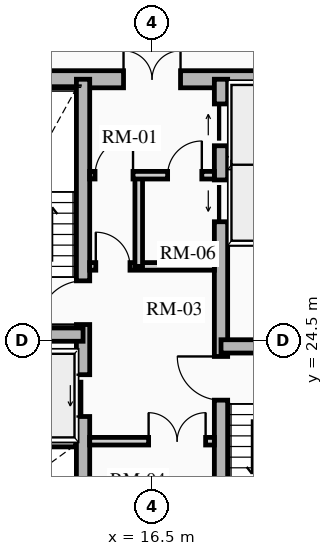
"""IFC4 building model, lengths in metres.
Left out: names, types, materials, properties, quantities, classifications, styles, units other than length and angle.
Written with IfcOpenShell. Run it as: python <this file> out.ifc"""

import sys

from ifc_helpers import new_model, si_unit, direction, frame, frame_2d, origin, place, context, subcontext, project, spatial, rectangle, extrude, source, transform, mapped, element, fill, save


model = new_model("IFC4")
c1 = context("Model", 3, precision=1e-05, world=origin(), true_north=direction((0.0, 1.0)))
c2 = subcontext(c1, "Body", "Model", "MODEL_VIEW")
j1 = project(units=[si_unit("LENGTHUNIT", "METRE"), si_unit("PLANEANGLEUNIT", "RADIAN")], contexts=[c1])
p1 = place(None, origin())
s1 = spatial("IfcSite", under=j1, at=p1, CompositionType="ELEMENT")
p2 = place(p1, origin())
s2 = spatial("IfcBuilding", under=s1, at=p2, CompositionType="ELEMENT")
p3 = place(p2, frame((0.0, 0.0, 78.88)))
s3 = spatial("IfcBuildingStorey", under=s2, at=p3, CompositionType="ELEMENT", Elevation=78.88)
p4 = place(p3, frame((11.15, 31.375, 0.0), z_axis=(0.0, 0.0, 1.0), x_axis=(1.0, 0.0, 0.0)))
e1 = element("IfcWall", 1, at=p4, inside=s3, PredefinedType="SHEAR", context=c2, shape_type="SweptSolid", body=[
    extrude(rectangle(XDim=10.7, YDim=0.45, at=frame_2d((5.35, 0.0))), origin(), (0.0, 0.0, 1.0), 2.91),
])
m1 = source(origin(), c2, "Body", "SweptSolid", [
    extrude(rectangle(XDim=1.5, YDim=2.02, at=frame_2d((0.75, 1.01))), frame((0.0, 0.235, 0.0), z_axis=(0.0, -1.0, 0.0), x_axis=(1.0, 0.0, 0.0)), (0.0, 0.0, 1.0), 0.47),
])
p5 = place(p4, frame((4.6, 0.0, 0.0)))
e2 = element("IfcOpeningElement", 2, at=p5, cuts=e1, PredefinedType="OPENING", context=c2, shape_type="MappedRepresentation", body=[
    mapped(m1, transform((0.0, 0.0, 0.0), x_axis=(1.0, 0.0, 0.0), y_axis=(0.0, 1.0, 0.0), z_axis=(0.0, 0.0, 1.0), scale=1.0)),
])
p6 = place(p3, frame((14.685, 17.625, 0.0), z_axis=(0.0, 0.0, 1.0), x_axis=(0.0, 1.0, 0.0)))
e3 = element("IfcWall", 3, at=p6, inside=s3, PredefinedType="SHEAR", context=c2, shape_type="SweptSolid", body=[
    extrude(rectangle(XDim=13.75, YDim=0.35, at=frame_2d((6.875, 0.0))), origin(), (0.0, 0.0, 1.0), 2.91),
])
m2 = source(origin(), c2, "Body", "SweptSolid", [
    extrude(rectangle(XDim=1.1, YDim=2.015, at=frame_2d((0.55, 1.007))), frame((0.0, 0.185, 0.0), z_axis=(0.0, -1.0, 0.0), x_axis=(1.0, 0.0, 0.0)), (0.0, 0.0, 1.0), 0.37),
])
p7 = place(p6, frame((4.875, 0.0, 0.0)))
e4 = element("IfcOpeningElement", 4, at=p7, cuts=e3, PredefinedType="OPENING", context=c2, shape_type="MappedRepresentation", body=[
    mapped(m2, transform((0.0, 0.0, 0.0), x_axis=(1.0, 0.0, 0.0), y_axis=(0.0, 1.0, 0.0), z_axis=(0.0, 0.0, 1.0), scale=1.0)),
])
m3 = source(origin(), c2, "Body", "SweptSolid", [
    extrude(rectangle(XDim=1.15, YDim=2.02, at=frame_2d((0.575, 1.01))), frame((0.0, 0.185, 0.0), z_axis=(0.0, -1.0, 0.0), x_axis=(1.0, 0.0, 0.0)), (0.0, 0.0, 1.0), 0.37),
])
p8 = place(p6, frame((7.295, 0.0, 0.0)))
e5 = element("IfcOpeningElement", 5, at=p8, cuts=e3, PredefinedType="OPENING", context=c2, shape_type="MappedRepresentation", body=[
    mapped(m3, transform((0.0, 0.0, 0.0), x_axis=(1.0, 0.0, 0.0), y_axis=(0.0, 1.0, 0.0), z_axis=(0.0, 0.0, 1.0), scale=1.0)),
])
p9 = place(p3, frame((18.315, 17.625, 0.0), z_axis=(0.0, 0.0, 1.0), x_axis=(0.0, 1.0, 0.0)))
e6 = element("IfcWall", 6, at=p9, inside=s3, PredefinedType="SHEAR", context=c2, shape_type="SweptSolid", body=[
    extrude(rectangle(XDim=13.75, YDim=0.35, at=frame_2d((6.875, 0.0))), origin(), (0.0, 0.0, 1.0), 2.91),
])
p10 = place(p9, frame((10.0, 0.0, 0.0)))
e7 = element("IfcOpeningElement", 7, at=p10, cuts=e6, PredefinedType="OPENING", context=c2, shape_type="MappedRepresentation", body=[
    mapped(m2, transform((0.0, 0.0, 0.0), x_axis=(1.0, 0.0, 0.0), y_axis=(0.0, 1.0, 0.0), z_axis=(0.0, 0.0, 1.0), scale=1.0)),
])
p11 = place(p9, frame((12.0, 0.0, 0.0)))
e8 = element("IfcOpeningElement", 8, at=p11, cuts=e6, PredefinedType="OPENING", context=c2, shape_type="MappedRepresentation", body=[
    mapped(m2, transform((0.0, 0.0, 0.0), x_axis=(1.0, 0.0, 0.0), y_axis=(0.0, 1.0, 0.0), z_axis=(0.0, 0.0, 1.0), scale=1.0)),
])
p12 = place(p9, frame((5.305, 0.0, 0.0)))
e9 = element("IfcOpeningElement", 9, at=p12, cuts=e6, PredefinedType="OPENING", context=c2, shape_type="MappedRepresentation", body=[
    mapped(m3, transform((0.0, 0.0, 0.0), x_axis=(1.0, 0.0, 0.0), y_axis=(0.0, 1.0, 0.0), z_axis=(0.0, 0.0, 1.0), scale=1.0)),
])
for number, where, z_axis, x_axis in (
    (10, (11.4, 24.655, 0.0), (0.0, 0.0, 1.0), (1.0, 0.0, 0.0)),
    (11, (18.315, 24.345, 0.0), (0.0, 0.0, 1.0), (1.0, 0.0, 0.0)),
):
    element("IfcWall", number, at=place(p3, frame(where, z_axis=z_axis, x_axis=x_axis)), inside=s3, PredefinedType="SHEAR", context=c2, shape_type="SweptSolid", body=[
        extrude(rectangle(XDim=3.285, YDim=0.35, at=frame_2d((1.643, 0.0))), origin(), (0.0, 0.0, 1.0), 2.91),
    ])
for number, where, z_axis, x_axis in (
    (12, (11.52, 21.8, 0.0), (0.0, 0.0, 1.0), (1.0, 0.0, 0.0)),
    (13, (18.51, 27.13, 0.0), (0.0, 0.0, 1.0), (1.0, 0.0, 0.0)),
    (14, (18.51, 29.175, 0.0), (0.0, 0.0, 1.0), (1.0, 0.0, 0.0)),
):
    element("IfcWall", number, at=place(p3, frame(where, z_axis=z_axis, x_axis=x_axis)), inside=s3, PredefinedType="SHEAR", context=c2, shape_type="SweptSolid", body=[
        extrude(rectangle(XDim=2.97, YDim=0.2, at=frame_2d((1.485, 0.0))), origin(), (0.0, 0.0, 1.0), 2.91),
    ])
p13 = place(p3, frame((14.86, 21.85, 0.0), z_axis=(0.0, 0.0, 1.0), x_axis=(1.0, 0.0, 0.0)))
e15 = element("IfcWall", 15, at=p13, inside=s3, PredefinedType="PARTITIONING", context=c2, shape_type="SweptSolid", body=[
    extrude(rectangle(XDim=3.28, YDim=0.2, at=frame_2d((1.64, 0.0))), origin(), (0.0, 0.0, 1.0), 2.655),
])
m4 = source(origin(), c2, "Body", "SweptSolid", [
    extrude(rectangle(XDim=1.5, YDim=2.02, at=frame_2d((0.75, 1.01))), frame((0.0, 0.11, 0.0), z_axis=(0.0, -1.0, 0.0), x_axis=(1.0, 0.0, 0.0)), (0.0, 0.0, 1.0), 0.22),
])
p14 = place(p13, frame((1.55, 0.0, 0.0)))
e16 = element("IfcOpeningElement", 16, at=p14, cuts=e15, PredefinedType="OPENING", context=c2, shape_type="MappedRepresentation", body=[
    mapped(m4, transform((0.0, 0.0, 0.0), x_axis=(1.0, 0.0, 0.0), y_axis=(0.0, 1.0, 0.0), z_axis=(0.0, 0.0, 1.0), scale=1.0)),
])
p15 = place(p3, frame((14.86, 26.45, 0.0), z_axis=(0.0, 0.0, 1.0), x_axis=(1.0, 0.0, 0.0)))
e17 = element("IfcWall", 17, at=p15, inside=s3, PredefinedType="PARTITIONING", context=c2, shape_type="SweptSolid", body=[
    extrude(rectangle(XDim=3.28, YDim=0.2, at=frame_2d((1.64, 0.0))), origin(), (0.0, 0.0, 1.0), 2.655),
])
m5 = source(origin(), c2, "Body", "SweptSolid", [
    extrude(rectangle(XDim=0.9, YDim=2.005, at=frame_2d((0.45, 1.002))), frame((0.0, 0.11, 0.0), z_axis=(0.0, -1.0, 0.0), x_axis=(1.0, 0.0, 0.0)), (0.0, 0.0, 1.0), 0.22),
])
p16 = place(p15, frame((0.16, 0.0, 0.0)))
e18 = element("IfcOpeningElement", 18, at=p16, cuts=e17, PredefinedType="OPENING", context=c2, shape_type="MappedRepresentation", body=[
    mapped(m5, transform((0.0, 0.0, 0.0), x_axis=(1.0, 0.0, 0.0), y_axis=(0.0, 1.0, 0.0), z_axis=(0.0, 0.0, 1.0), scale=1.0)),
])
p17 = place(p3, frame((16.15, 26.45, 0.0), z_axis=(0.0, 0.0, 1.0), x_axis=(0.0, 1.0, 0.0)))
e19 = element("IfcWall", 19, at=p17, inside=s3, PredefinedType="PARTITIONING", context=c2, shape_type="SweptSolid", body=[
    extrude(rectangle(XDim=2.4, YDim=0.2, at=frame_2d((1.2, 0.0))), origin(), (0.0, 0.0, 1.0), 2.655),
])
p18 = place(p3, frame((14.86, 28.85, 0.0), z_axis=(0.0, 0.0, 1.0), x_axis=(1.0, 0.0, 0.0)))
e20 = element("IfcWall", 20, at=p18, inside=s3, PredefinedType="PARTITIONING", context=c2, shape_type="SweptSolid", body=[
    extrude(rectangle(XDim=3.28, YDim=0.2, at=frame_2d((1.64, 0.0))), origin(), (0.0, 0.0, 1.0), 2.655),
])
m6 = source(origin(), c2, "Body", "SweptSolid", [
    extrude(rectangle(XDim=1.0, YDim=2.015, at=frame_2d((0.5, 1.007))), frame((0.0, 0.11, 0.0), z_axis=(0.0, -1.0, 0.0), x_axis=(1.0, 0.0, 0.0)), (0.0, 0.0, 1.0), 0.22),
])
p19 = place(p18, frame((0.14, 0.0, 0.0)))
e21 = element("IfcOpeningElement", 21, at=p19, cuts=e20, PredefinedType="OPENING", context=c2, shape_type="MappedRepresentation", body=[
    mapped(m6, transform((0.0, 0.0, 0.0), x_axis=(1.0, 0.0, 0.0), y_axis=(0.0, 1.0, 0.0), z_axis=(0.0, 0.0, 1.0), scale=1.0)),
])
p20 = place(p18, frame((2.05, 0.0, 0.0)))
e22 = element("IfcOpeningElement", 22, at=p20, cuts=e20, PredefinedType="OPENING", context=c2, shape_type="MappedRepresentation", body=[
    mapped(m5, transform((0.0, 0.0, 0.0), x_axis=(1.0, 0.0, 0.0), y_axis=(0.0, 1.0, 0.0), z_axis=(0.0, 0.0, 1.0), scale=1.0)),
])
m7 = source(origin(), c2, "Body", "SweptSolid", [
    extrude(rectangle(XDim=1.1, YDim=2.015, at=frame_2d((0.55, 1.007))), frame((0.0, 0.025, 0.0), z_axis=(0.0, -1.0, 0.0), x_axis=(1.0, 0.0, 0.0)), (0.0, 0.0, 1.0), 0.05),
])
p21 = place(p7, origin())
e23 = element("IfcDoor", 23, at=p21, inside=s3, OperationType="SLIDING_TO_LEFT", PredefinedType="DOOR", context=c2, shape_type="MappedRepresentation", body=[
    mapped(m7, transform((0.0, 0.0, 0.0), x_axis=(1.0, 0.0, 0.0), y_axis=(0.0, 1.0, 0.0), z_axis=(0.0, 0.0, 1.0), scale=1.0)),
])
fill(e4, e23)
p22 = place(p10, origin())
e24 = element("IfcDoor", 24, at=p22, inside=s3, OperationType="SLIDING_TO_LEFT", PredefinedType="DOOR", context=c2, shape_type="MappedRepresentation", body=[
    mapped(m7, transform((0.0, 0.0, 0.0), x_axis=(1.0, 0.0, 0.0), y_axis=(0.0, 1.0, 0.0), z_axis=(0.0, 0.0, 1.0), scale=1.0)),
])
fill(e7, e24)
p23 = place(p11, origin())
e25 = element("IfcDoor", 25, at=p23, inside=s3, OperationType="SLIDING_TO_RIGHT", PredefinedType="DOOR", context=c2, shape_type="MappedRepresentation", body=[
    mapped(m7, transform((0.0, 0.0, 0.0), x_axis=(1.0, 0.0, 0.0), y_axis=(0.0, 1.0, 0.0), z_axis=(0.0, 0.0, 1.0), scale=1.0)),
])
fill(e8, e25)
m8 = source(origin(), c2, "Body", "SweptSolid", [
    extrude(rectangle(XDim=1.15, YDim=2.02, at=frame_2d((0.575, 1.01))), frame((0.0, 0.025, 0.0), z_axis=(0.0, -1.0, 0.0), x_axis=(1.0, 0.0, 0.0)), (0.0, 0.0, 1.0), 0.05),
])
p24 = place(p8, origin())
e26 = element("IfcDoor", 26, at=p24, inside=s3, OperationType="SINGLE_SWING_LEFT", PredefinedType="DOOR", context=c2, shape_type="MappedRepresentation", body=[
    mapped(m8, transform((0.0, 0.0, 0.0), x_axis=(1.0, 0.0, 0.0), y_axis=(0.0, 1.0, 0.0), z_axis=(0.0, 0.0, 1.0), scale=1.0)),
])
fill(e5, e26)
p25 = place(p12, origin())
e27 = element("IfcDoor", 27, at=p25, inside=s3, OperationType="SINGLE_SWING_RIGHT", PredefinedType="DOOR", context=c2, shape_type="MappedRepresentation", body=[
    mapped(m8, transform((0.0, 0.0, 0.0), x_axis=(1.0, 0.0, 0.0), y_axis=(0.0, 1.0, 0.0), z_axis=(0.0, 0.0, 1.0), scale=1.0)),
])
fill(e9, e27)
m9 = source(origin(), c2, "Body", "SweptSolid", [
    extrude(rectangle(XDim=1.5, YDim=2.02, at=frame_2d((0.75, 1.01))), frame((0.0, 0.025, 0.0), z_axis=(0.0, -1.0, 0.0), x_axis=(1.0, 0.0, 0.0)), (0.0, 0.0, 1.0), 0.05),
])
p26 = place(p5, origin())
e28 = element("IfcDoor", 28, at=p26, inside=s3, OperationType="DOUBLE_DOOR_SINGLE_SWING", PredefinedType="DOOR", context=c2, shape_type="MappedRepresentation", body=[
    mapped(m9, transform((0.0, 0.0, 0.0), x_axis=(1.0, 0.0, 0.0), y_axis=(0.0, 1.0, 0.0), z_axis=(0.0, 0.0, 1.0), scale=1.0)),
])
fill(e2, e28)
p27 = place(p14, origin())
e29 = element("IfcDoor", 29, at=p27, inside=s3, OperationType="DOUBLE_DOOR_SINGLE_SWING", PredefinedType="DOOR", context=c2, shape_type="MappedRepresentation", body=[
    mapped(m9, transform((0.0, 0.0, 0.0), x_axis=(1.0, 0.0, 0.0), y_axis=(0.0, 1.0, 0.0), z_axis=(0.0, 0.0, 1.0), scale=1.0)),
])
fill(e16, e29)
m10 = source(origin(), c2, "Body", "SweptSolid", [
    extrude(rectangle(XDim=0.9, YDim=2.005, at=frame_2d((0.45, 1.002))), frame((0.0, 0.025, 0.0), z_axis=(0.0, -1.0, 0.0), x_axis=(1.0, 0.0, 0.0)), (0.0, 0.0, 1.0), 0.05),
])
p28 = place(p16, origin())
e30 = element("IfcDoor", 30, at=p28, inside=s3, OperationType="SINGLE_SWING_LEFT", PredefinedType="DOOR", context=c2, shape_type="MappedRepresentation", body=[
    mapped(m10, transform((0.0, 0.0, 0.0), x_axis=(1.0, 0.0, 0.0), y_axis=(0.0, 1.0, 0.0), z_axis=(0.0, 0.0, 1.0), scale=1.0)),
])
fill(e18, e30)
m11 = source(origin(), c2, "Body", "SweptSolid", [
    extrude(rectangle(XDim=1.0, YDim=2.015, at=frame_2d((0.5, 1.007))), frame((0.0, 0.025, 0.0), z_axis=(0.0, -1.0, 0.0), x_axis=(1.0, 0.0, 0.0)), (0.0, 0.0, 1.0), 0.05),
])
p29 = place(p19, origin())
e31 = element("IfcDoor", 31, at=p29, inside=s3, OperationType="SINGLE_SWING_RIGHT", PredefinedType="DOOR", context=c2, shape_type="MappedRepresentation", body=[
    mapped(m11, transform((0.0, 0.0, 0.0), x_axis=(1.0, 0.0, 0.0), y_axis=(0.0, 1.0, 0.0), z_axis=(0.0, 0.0, 1.0), scale=1.0)),
])
fill(e21, e31)
p30 = place(p20, origin())
e32 = element("IfcDoor", 32, at=p30, inside=s3, OperationType="SINGLE_SWING_RIGHT", PredefinedType="DOOR", context=c2, shape_type="MappedRepresentation", body=[
    mapped(m10, transform((0.0, 0.0, 0.0), x_axis=(1.0, 0.0, 0.0), y_axis=(0.0, 1.0, 0.0), z_axis=(0.0, 0.0, 1.0), scale=1.0)),
])
fill(e22, e32)
save(model, sys.argv[1])
